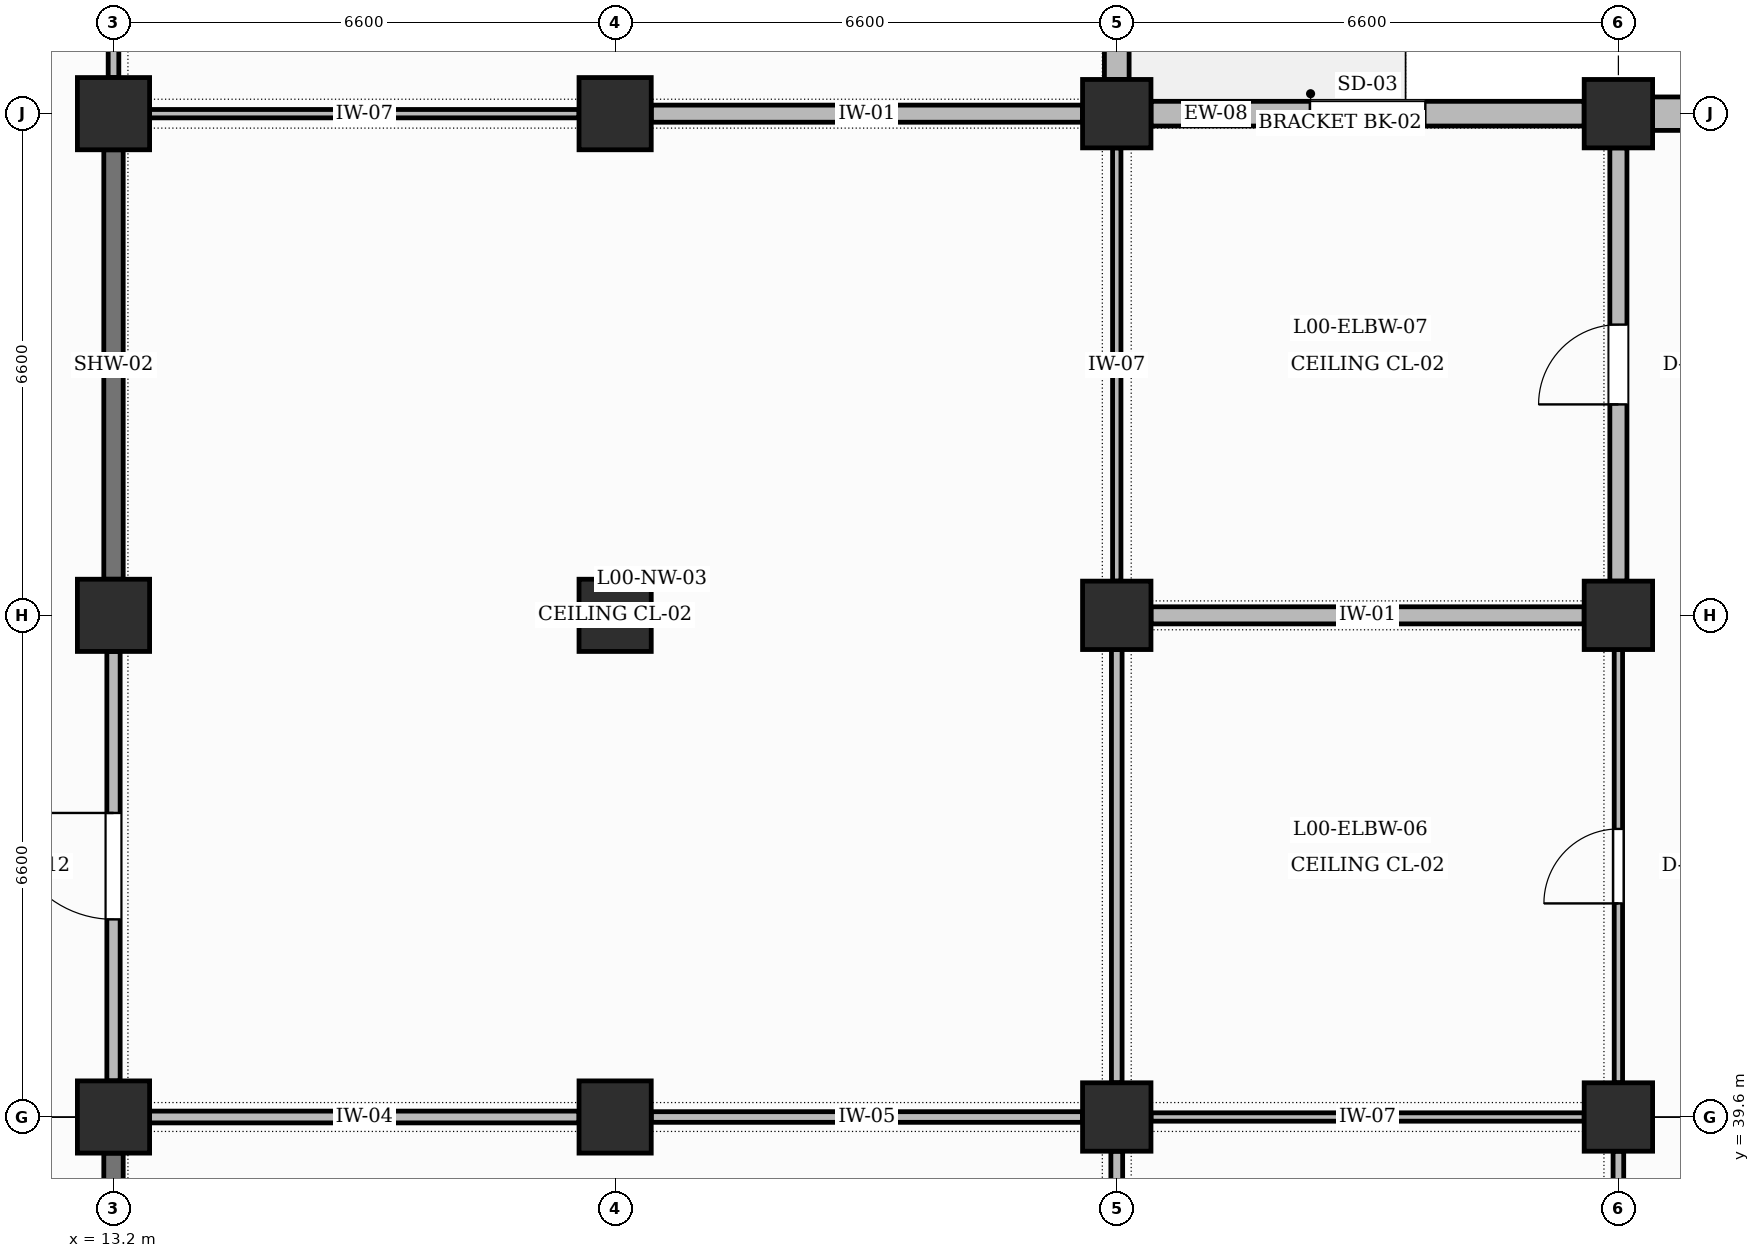
"""IFC4 building model, lengths in metres.
Left out: names, types, materials, properties, quantities, classifications, styles, units other than length and angle.
Written with IfcOpenShell. Run it as: python <this file> out.ifc"""

import sys

from ifc_helpers import new_model, si_unit, direction, frame, frame_2d, origin, origin_2d, place, context, subcontext, project, spatial, rectangle, extrude, element, fill, save


model = new_model("IFC4")
c1 = context("Model", 3, precision=1e-05, world=origin(), true_north=direction((0.0, 1.0)))
c2 = subcontext(c1, "Body", "Model", "MODEL_VIEW")
j1 = project(units=[si_unit("LENGTHUNIT", "METRE"), si_unit("PLANEANGLEUNIT", "RADIAN")], contexts=[c1])
p1 = place(None, origin())
s1 = spatial("IfcSite", under=j1, at=p1, CompositionType="ELEMENT")
p2 = place(p1, origin())
s2 = spatial("IfcBuilding", under=s1, at=p2, CompositionType="ELEMENT")
p3 = place(p2, origin())
s3 = spatial("IfcBuildingStorey", under=s2, at=p3, CompositionType="ELEMENT", Elevation=0.0)
for number, where, z_axis, x_axis in (
    (1, (13.2, 39.6, 0.0), (0.0, 0.0, 1.0), (1.0, 0.0, 0.0)),
    (2, (13.2, 46.2, 0.0), (0.0, 0.0, 1.0), (1.0, 0.0, 0.0)),
    (3, (13.2, 52.8, 0.0), (0.0, 0.0, 1.0), (1.0, 0.0, 0.0)),
    (4, (19.8, 39.6, 0.0), (0.0, 0.0, 1.0), (1.0, 0.0, 0.0)),
    (5, (19.8, 46.2, 0.0), (0.0, 0.0, 1.0), (1.0, 0.0, 0.0)),
    (6, (19.8, 52.8, 0.0), (0.0, 0.0, 1.0), (1.0, 0.0, 0.0)),
):
    element("IfcColumn", number, at=place(p3, frame(where, z_axis=z_axis, x_axis=x_axis)), inside=s3, PredefinedType="COLUMN", context=c2, shape_type="SweptSolid", body=[
        extrude(rectangle(XDim=0.95, YDim=0.95, at=origin_2d()), origin(), (0.0, 0.0, 1.0), 5.4),
    ])
for number, where, z_axis, x_axis in (
    (7, (26.4, 39.6, 0.0), (0.0, 0.0, 1.0), (1.0, 0.0, 0.0)),
    (8, (26.4, 46.2, 0.0), (0.0, 0.0, 1.0), (1.0, 0.0, 0.0)),
    (9, (26.4, 52.8, 0.0), (0.0, 0.0, 1.0), (1.0, 0.0, 0.0)),
    (10, (33.0, 39.6, 0.0), (0.0, 0.0, 1.0), (1.0, 0.0, 0.0)),
    (11, (33.0, 46.2, 0.0), (0.0, 0.0, 1.0), (1.0, 0.0, 0.0)),
    (12, (33.0, 52.8, 0.0), (0.0, 0.0, 1.0), (1.0, 0.0, 0.0)),
):
    element("IfcColumn", number, at=place(p3, frame(where, z_axis=z_axis, x_axis=x_axis)), inside=s3, PredefinedType="COLUMN", context=c2, shape_type="SweptSolid", body=[
        extrude(rectangle(XDim=0.9, YDim=0.9, at=origin_2d()), origin(), (0.0, 0.0, 1.0), 5.4),
    ])
p4 = place(p3, frame((26.4, 53.25, 0.0), z_axis=(0.0, 0.0, 1.0), x_axis=(0.0, 1.0, 0.0)))
e13 = element("IfcWall", 13, at=p4, inside=s3, PredefinedType="SOLIDWALL", context=c2, shape_type="SweptSolid", body=[
    extrude(rectangle(XDim=5.7, YDim=0.325, at=frame_2d((2.85, 0.0))), origin(), (0.0, 0.0, 1.0), 4.45),
])
p5 = place(p4, frame((0.8, 0.0, 0.95)))
e14 = element("IfcOpeningElement", 14, at=p5, cuts=e13, PredefinedType="OPENING", context=c2, shape_type="SweptSolid", body=[
    extrude(rectangle(XDim=0.88, YDim=1.74, at=frame_2d((0.44, 0.87))), frame((0.0, 0.172, 0.0), z_axis=(0.0, -1.0, 0.0), x_axis=(1.0, 0.0, 0.0)), (0.0, 0.0, 1.0), 0.345),
])
p6 = place(p4, frame((4.02, 0.0, 0.95)))
e15 = element("IfcOpeningElement", 15, at=p6, cuts=e13, PredefinedType="OPENING", context=c2, shape_type="SweptSolid", body=[
    extrude(rectangle(XDim=0.88, YDim=1.74, at=frame_2d((0.44, 0.87))), frame((0.0, 0.172, 0.0), z_axis=(0.0, -1.0, 0.0), x_axis=(1.0, 0.0, 0.0)), (0.0, 0.0, 1.0), 0.345),
])
p7 = place(p3, frame((26.85, 52.8, 0.0), z_axis=(0.0, 0.0, 1.0), x_axis=(1.0, 0.0, 0.0)))
e16 = element("IfcWall", 16, at=p7, inside=s3, PredefinedType="SOLIDWALL", context=c2, shape_type="SweptSolid", body=[
    extrude(rectangle(XDim=5.7, YDim=0.325, at=frame_2d((2.85, 0.0))), origin(), (0.0, 0.0, 1.0), 4.45),
])
p8 = place(p7, frame((2.09, 0.0, 0.95)))
e17 = element("IfcOpeningElement", 17, at=p8, cuts=e16, PredefinedType="OPENING", context=c2, shape_type="SweptSolid", body=[
    extrude(rectangle(XDim=1.52, YDim=1.74, at=frame_2d((0.76, 0.87))), frame((0.0, 0.172, 0.0), z_axis=(0.0, -1.0, 0.0), x_axis=(1.0, 0.0, 0.0)), (0.0, 0.0, 1.0), 0.345),
])
p9 = place(p3, frame((33.45, 52.8, 0.0), z_axis=(0.0, 0.0, 1.0), x_axis=(1.0, 0.0, 0.0)))
e18 = element("IfcWall", 18, at=p9, inside=s3, PredefinedType="SOLIDWALL", context=c2, shape_type="SweptSolid", body=[
    extrude(rectangle(XDim=5.7, YDim=0.44, at=frame_2d((2.85, 0.0))), origin(), (0.0, 0.0, 1.0), 4.45),
])
p10 = place(p9, frame((2.09, 0.0, 0.95)))
e19 = element("IfcOpeningElement", 19, at=p10, cuts=e18, PredefinedType="OPENING", context=c2, shape_type="SweptSolid", body=[
    extrude(rectangle(XDim=1.52, YDim=1.96, at=frame_2d((0.76, 0.98))), frame((0.0, 0.23, 0.0), z_axis=(0.0, -1.0, 0.0), x_axis=(1.0, 0.0, 0.0)), (0.0, 0.0, 1.0), 0.46),
])
p11 = place(p3, frame((13.2, 33.475, 0.0), z_axis=(0.0, 0.0, 1.0), x_axis=(0.0, 1.0, 0.0)))
e20 = element("IfcWall", 20, at=p11, inside=s3, PredefinedType="SHEAR", context=c2, shape_type="SweptSolid", body=[
    extrude(rectangle(XDim=5.65, YDim=0.255, at=frame_2d((2.825, 0.0))), origin(), (0.0, 0.0, 1.0), 4.3),
])
p12 = place(p3, frame((13.2, 40.075, 0.0), z_axis=(0.0, 0.0, 1.0), x_axis=(0.0, 1.0, 0.0)))
e21 = element("IfcWall", 21, at=p12, inside=s3, PredefinedType="PARTITIONING", context=c2, shape_type="SweptSolid", body=[
    extrude(rectangle(XDim=5.65, YDim=0.175, at=frame_2d((2.825, 0.0))), origin(), (0.0, 0.0, 1.0), 4.3),
])
p13 = place(p12, frame((2.125, 0.0, 0.0)))
e22 = element("IfcOpeningElement", 22, at=p13, cuts=e21, PredefinedType="OPENING", context=c2, shape_type="SweptSolid", body=[
    extrude(rectangle(XDim=1.4, YDim=2.25, at=frame_2d((0.7, 1.125))), frame((0.0, 0.097, 0.0), z_axis=(0.0, -1.0, 0.0), x_axis=(1.0, 0.0, 0.0)), (0.0, 0.0, 1.0), 0.195),
])
p14 = place(p3, frame((13.2, 46.675, 0.0), z_axis=(0.0, 0.0, 1.0), x_axis=(0.0, 1.0, 0.0)))
e23 = element("IfcWall", 23, at=p14, inside=s3, PredefinedType="SHEAR", context=c2, shape_type="SweptSolid", body=[
    extrude(rectangle(XDim=5.65, YDim=0.255, at=frame_2d((2.825, 0.0))), origin(), (0.0, 0.0, 1.0), 4.3),
])
p15 = place(p3, frame((13.2, 53.275, 0.0), z_axis=(0.0, 0.0, 1.0), x_axis=(0.0, 1.0, 0.0)))
e24 = element("IfcWall", 24, at=p15, inside=s3, PredefinedType="PARTITIONING", context=c2, shape_type="SweptSolid", body=[
    extrude(rectangle(XDim=5.675, YDim=0.14, at=frame_2d((2.837, 0.0))), origin(), (0.0, 0.0, 1.0), 4.3),
])
p16 = place(p15, frame((2.15, 0.0, 0.0)))
e25 = element("IfcOpeningElement", 25, at=p16, cuts=e24, PredefinedType="OPENING", context=c2, shape_type="SweptSolid", body=[
    extrude(rectangle(XDim=1.35, YDim=2.3, at=frame_2d((0.675, 1.15))), frame((0.0, 0.08, 0.0), z_axis=(0.0, -1.0, 0.0), x_axis=(1.0, 0.0, 0.0)), (0.0, 0.0, 1.0), 0.16),
])
p17 = place(p3, frame((13.675, 39.6, 0.0), z_axis=(0.0, 0.0, 1.0), x_axis=(1.0, 0.0, 0.0)))
e26 = element("IfcWall", 26, at=p17, inside=s3, PredefinedType="PARTITIONING", context=c2, shape_type="SweptSolid", body=[
    extrude(rectangle(XDim=5.65, YDim=0.155, at=frame_2d((2.825, 0.0))), origin(), (0.0, 0.0, 1.0), 4.2),
])
p18 = place(p3, frame((13.675, 52.8, 0.0), z_axis=(0.0, 0.0, 1.0), x_axis=(1.0, 0.0, 0.0)))
e27 = element("IfcWall", 27, at=p18, inside=s3, PredefinedType="PARTITIONING", context=c2, shape_type="SweptSolid", body=[
    extrude(rectangle(XDim=5.65, YDim=0.11, at=frame_2d((2.825, 0.0))), origin(), (0.0, 0.0, 1.0), 4.2),
])
p19 = place(p3, frame((26.4, 33.45, 0.0), z_axis=(0.0, 0.0, 1.0), x_axis=(0.0, 1.0, 0.0)))
e28 = element("IfcWall", 28, at=p19, inside=s3, PredefinedType="PARTITIONING", context=c2, shape_type="SweptSolid", body=[
    extrude(rectangle(XDim=5.7, YDim=0.155, at=frame_2d((2.85, 0.0))), origin(), (0.0, 0.0, 1.0), 4.3),
])
p20 = place(p3, frame((20.275, 39.6, 0.0), z_axis=(0.0, 0.0, 1.0), x_axis=(1.0, 0.0, 0.0)))
e29 = element("IfcWall", 29, at=p20, inside=s3, PredefinedType="PARTITIONING", context=c2, shape_type="SweptSolid", body=[
    extrude(rectangle(XDim=5.675, YDim=0.14, at=frame_2d((2.837, 0.0))), origin(), (0.0, 0.0, 1.0), 4.3),
])
p21 = place(p3, frame((26.4, 40.05, 0.0), z_axis=(0.0, 0.0, 1.0), x_axis=(0.0, 1.0, 0.0)))
e30 = element("IfcWall", 30, at=p21, inside=s3, PredefinedType="PARTITIONING", context=c2, shape_type="SweptSolid", body=[
    extrude(rectangle(XDim=5.7, YDim=0.14, at=frame_2d((2.85, 0.0))), origin(), (0.0, 0.0, 1.0), 4.3),
])
p22 = place(p3, frame((26.4, 46.65, 0.0), z_axis=(0.0, 0.0, 1.0), x_axis=(0.0, 1.0, 0.0)))
e31 = element("IfcWall", 31, at=p22, inside=s3, PredefinedType="PARTITIONING", context=c2, shape_type="SweptSolid", body=[
    extrude(rectangle(XDim=5.7, YDim=0.11, at=frame_2d((2.85, 0.0))), origin(), (0.0, 0.0, 1.0), 4.3),
])
p23 = place(p3, frame((20.275, 52.8, 0.0), z_axis=(0.0, 0.0, 1.0), x_axis=(1.0, 0.0, 0.0)))
e32 = element("IfcWall", 32, at=p23, inside=s3, PredefinedType="PARTITIONING", context=c2, shape_type="SweptSolid", body=[
    extrude(rectangle(XDim=5.675, YDim=0.225, at=frame_2d((2.837, 0.0))), origin(), (0.0, 0.0, 1.0), 4.3),
])
p24 = place(p3, frame((33.0, 33.45, 0.0), z_axis=(0.0, 0.0, 1.0), x_axis=(0.0, 1.0, 0.0)))
e33 = element("IfcWall", 33, at=p24, inside=s3, PredefinedType="PARTITIONING", context=c2, shape_type="SweptSolid", body=[
    extrude(rectangle(XDim=5.7, YDim=0.14, at=frame_2d((2.85, 0.0))), origin(), (0.0, 0.0, 1.0), 4.3),
])
p25 = place(p24, frame((2.26, 0.0, 0.0)))
e34 = element("IfcOpeningElement", 34, at=p25, cuts=e33, PredefinedType="OPENING", context=c2, shape_type="SweptSolid", body=[
    extrude(rectangle(XDim=1.18, YDim=2.2, at=frame_2d((0.59, 1.1))), frame((0.0, 0.08, 0.0), z_axis=(0.0, -1.0, 0.0), x_axis=(1.0, 0.0, 0.0)), (0.0, 0.0, 1.0), 0.16),
])
p26 = place(p3, frame((26.85, 39.6, 0.0), z_axis=(0.0, 0.0, 1.0), x_axis=(1.0, 0.0, 0.0)))
e35 = element("IfcWall", 35, at=p26, inside=s3, PredefinedType="PARTITIONING", context=c2, shape_type="SweptSolid", body=[
    extrude(rectangle(XDim=5.7, YDim=0.11, at=frame_2d((2.85, 0.0))), origin(), (0.0, 0.0, 1.0), 4.2),
])
p27 = place(p3, frame((33.0, 40.05, 0.0), z_axis=(0.0, 0.0, 1.0), x_axis=(0.0, 1.0, 0.0)))
e36 = element("IfcWall", 36, at=p27, inside=s3, PredefinedType="PARTITIONING", context=c2, shape_type="SweptSolid", body=[
    extrude(rectangle(XDim=5.7, YDim=0.11, at=frame_2d((2.85, 0.0))), origin(), (0.0, 0.0, 1.0), 4.3),
])
p28 = place(p27, frame((2.36, 0.0, 0.0)))
e37 = element("IfcOpeningElement", 37, at=p28, cuts=e36, PredefinedType="OPENING", context=c2, shape_type="SweptSolid", body=[
    extrude(rectangle(XDim=0.98, YDim=2.15, at=frame_2d((0.49, 1.075))), frame((0.0, 0.065, 0.0), z_axis=(0.0, -1.0, 0.0), x_axis=(1.0, 0.0, 0.0)), (0.0, 0.0, 1.0), 0.13),
])
p29 = place(p3, frame((26.85, 46.2, 0.0), z_axis=(0.0, 0.0, 1.0), x_axis=(1.0, 0.0, 0.0)))
e38 = element("IfcWall", 38, at=p29, inside=s3, PredefinedType="PARTITIONING", context=c2, shape_type="SweptSolid", body=[
    extrude(rectangle(XDim=5.7, YDim=0.225, at=frame_2d((2.85, 0.0))), origin(), (0.0, 0.0, 1.0), 4.3),
])
p30 = place(p3, frame((33.0, 46.65, 0.0), z_axis=(0.0, 0.0, 1.0), x_axis=(0.0, 1.0, 0.0)))
e39 = element("IfcWall", 39, at=p30, inside=s3, PredefinedType="PARTITIONING", context=c2, shape_type="SweptSolid", body=[
    extrude(rectangle(XDim=5.7, YDim=0.225, at=frame_2d((2.85, 0.0))), origin(), (0.0, 0.0, 1.0), 4.3),
])
p31 = place(p30, frame((2.325, 0.0, 0.0)))
e40 = element("IfcOpeningElement", 40, at=p31, cuts=e39, PredefinedType="OPENING", context=c2, shape_type="SweptSolid", body=[
    extrude(rectangle(XDim=1.05, YDim=2.15, at=frame_2d((0.525, 1.075))), frame((0.0, 0.123, 0.0), z_axis=(0.0, -1.0, 0.0), x_axis=(1.0, 0.0, 0.0)), (0.0, 0.0, 1.0), 0.245),
])
p32 = place(p8, origin())
e41 = element("IfcWindow", 41, at=p32, inside=s3, PartitioningType="DOUBLE_PANEL_VERTICAL", PredefinedType="WINDOW", context=c2, shape_type="SweptSolid", body=[
    extrude(rectangle(XDim=1.52, YDim=1.74, at=frame_2d((0.76, 0.87))), frame((0.0, 0.03, 0.0), z_axis=(0.0, -1.0, 0.0), x_axis=(1.0, 0.0, 0.0)), (0.0, 0.0, 1.0), 0.06),
])
fill(e17, e41)
p33 = place(p28, origin())
e42 = element("IfcDoor", 42, at=p33, inside=s3, OperationType="SINGLE_SWING_LEFT", PredefinedType="DOOR", context=c2, shape_type="SweptSolid", body=[
    extrude(rectangle(XDim=0.98, YDim=2.15, at=frame_2d((0.49, 1.075))), frame((0.0, 0.025, 0.0), z_axis=(0.0, -1.0, 0.0), x_axis=(1.0, 0.0, 0.0)), (0.0, 0.0, 1.0), 0.05),
])
fill(e37, e42)
p34 = place(p31, origin())
e43 = element("IfcDoor", 43, at=p34, inside=s3, OperationType="SINGLE_SWING_LEFT", PredefinedType="DOOR", context=c2, shape_type="SweptSolid", body=[
    extrude(rectangle(XDim=1.05, YDim=2.15, at=frame_2d((0.525, 1.075))), frame((0.0, 0.025, 0.0), z_axis=(0.0, -1.0, 0.0), x_axis=(1.0, 0.0, 0.0)), (0.0, 0.0, 1.0), 0.05),
])
fill(e40, e43)
p35 = place(p13, origin())
e44 = element("IfcDoor", 44, at=p35, inside=s3, OperationType="SINGLE_SWING_RIGHT", PredefinedType="DOOR", context=c2, shape_type="SweptSolid", body=[
    extrude(rectangle(XDim=1.4, YDim=2.25, at=frame_2d((0.7, 1.125))), frame((0.0, 0.025, 0.0), z_axis=(0.0, -1.0, 0.0), x_axis=(1.0, 0.0, 0.0)), (0.0, 0.0, 1.0), 0.05),
])
fill(e22, e44)
save(model, sys.argv[1])
